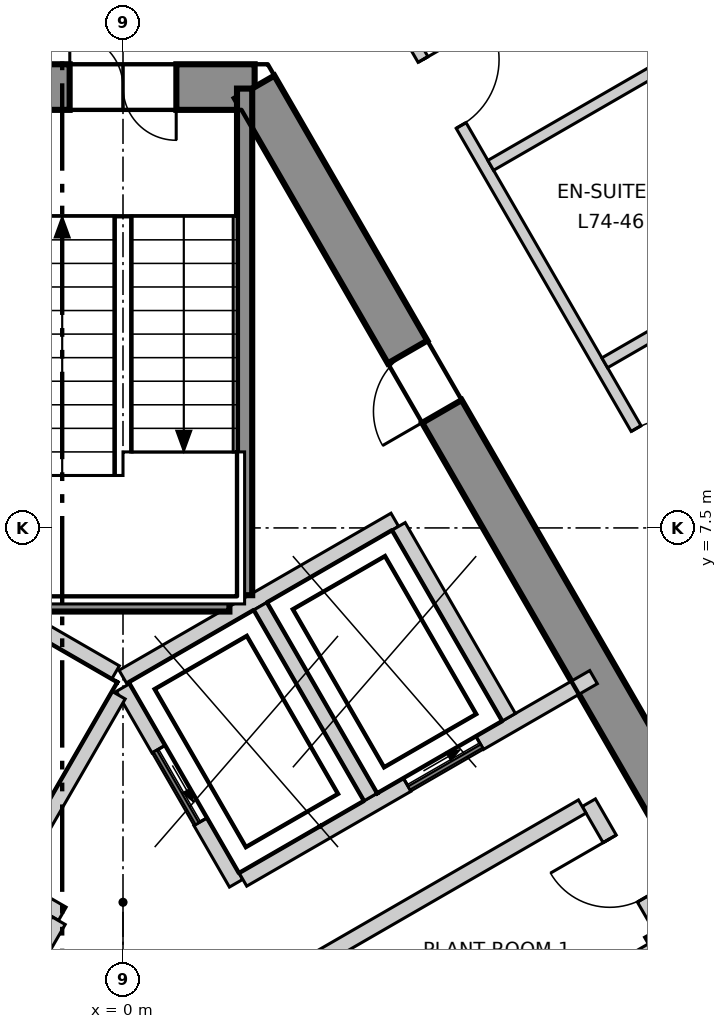
"""IFC4 building model, lengths in metres.
Left out: names, types, materials, properties, quantities, classifications, styles, units other than length and angle.
Written with IfcOpenShell. Run it as: python <this file> out.ifc"""

import sys

from ifc_helpers import new_model, si_unit, direction, frame, frame_2d, origin, place, context, subcontext, project, spatial, polyline, rectangle, outline, extrude, element, fill, save


model = new_model("IFC4")
c1 = context("Model", 3, precision=1e-05, world=origin(), true_north=direction((0.0, 1.0)))
c2 = subcontext(c1, "Body", "Model", "MODEL_VIEW")
j1 = project(units=[si_unit("LENGTHUNIT", "METRE"), si_unit("PLANEANGLEUNIT", "RADIAN")], contexts=[c1])
p1 = place(None, origin())
s1 = spatial("IfcSite", under=j1, at=p1, CompositionType="ELEMENT")
p2 = place(p1, origin())
s2 = spatial("IfcBuilding", under=s1, at=p2, CompositionType="ELEMENT")
p3 = place(p2, frame((0.0, 0.0, 311.5)))
s3 = spatial("IfcBuildingStorey", under=s2, at=p3, CompositionType="ELEMENT", Elevation=311.5)
p4 = place(p3, frame((1.732, 13.3, -0.3), z_axis=(0.0, 0.0, 1.0), x_axis=(-1.0, 0.0, 0.0)))
e1 = element("IfcWall", 1, at=p4, inside=s3, PredefinedType="SHEAR", context=c2, shape_type="SweptSolid", body=[
    extrude(outline(polyline([(-0.173, -0.3), (1.732, -0.3), (3.637, -0.3), (3.291, 0.3), (1.732, 0.3), (0.173, 0.3), (-0.173, -0.3)])), origin(), (0.0, 0.0, 1.0), 3.6),
])
p5 = place(p4, frame((1.032, 0.0, 0.3)))
e2 = element("IfcOpeningElement", 2, at=p5, cuts=e1, PredefinedType="OPENING", context=c2, shape_type="SweptSolid", body=[
    extrude(rectangle(XDim=1.4, YDim=2.1, at=frame_2d((0.7, 1.05))), frame((0.0, 0.31, 0.0), z_axis=(0.0, -1.0, 0.0), x_axis=(1.0, 0.0, 0.0)), (0.0, 0.0, 1.0), 0.62),
])
p6 = place(p3, frame((12.384, -5.15, -0.3), z_axis=(0.0, 0.0, 1.0), x_axis=(-0.500000539815, 0.866025092122, 0.0)))
e3 = element("IfcWall", 3, at=p6, inside=s3, PredefinedType="SHEAR", context=c2, shape_type="SweptSolid", body=[
    extrude(outline(polyline([(-0.173, -0.301), (1.795, -0.301), (3.763, -0.301), (5.731, -0.301), (7.7, -0.301), (9.668, -0.301), (11.636, -0.301), (13.604, -0.3), (15.573, -0.3), (17.541, -0.3), (19.509, -0.3), (21.477, -0.3), (21.131, 0.3), (19.226, 0.3), (17.321, 0.3), (15.415, 0.3), (13.51, 0.3), (11.605, 0.3), (9.699, 0.3), (7.794, 0.3), (5.889, 0.3), (3.984, 0.3), (2.078, 0.3), (0.173, 0.3), (-0.173, -0.301)])), origin(), (0.0, 0.0, 1.0), 3.6),
])
p7 = place(p6, frame((16.378, 0.0, 0.3)))
e4 = element("IfcOpeningElement", 4, at=p7, cuts=e3, PredefinedType="OPENING", context=c2, shape_type="SweptSolid", body=[
    extrude(rectangle(XDim=0.9, YDim=2.1, at=frame_2d((0.45, 1.05))), frame((0.0, 0.31, 0.0), z_axis=(0.0, -1.0, 0.0), x_axis=(1.0, 0.0, 0.0)), (0.0, 0.0, 1.0), 0.621),
])
p8 = place(p6, frame((4.026, 0.0, 0.3)))
e5 = element("IfcOpeningElement", 5, at=p8, cuts=e3, PredefinedType="OPENING", context=c2, shape_type="SweptSolid", body=[
    extrude(rectangle(XDim=0.9, YDim=2.1, at=frame_2d((0.45, 1.05))), frame((0.0, 0.31, 0.0), z_axis=(0.0, -1.0, 0.0), x_axis=(1.0, 0.0, 0.0)), (0.0, 0.0, 1.0), 0.621),
])
p9 = place(p3, frame((24.544, -11.385, 0.0), z_axis=(0.0, 0.0, 1.0), x_axis=(-0.500002044679, 0.866024223285, 0.0)))
e6 = element("IfcWall", 6, at=p9, inside=s3, PredefinedType="ELEMENTEDWALL", context=c2, shape_type="SweptSolid", body=[
    extrude(rectangle(XDim=44.243, YDim=0.2, at=frame_2d((22.122, 0.0))), origin(), (0.0, 0.0, 1.0), 3.3),
])
p10 = place(p9, frame((2.056, 0.0, 0.9)))
e7 = element("IfcOpeningElement", 7, at=p10, cuts=e6, PredefinedType="OPENING", context=c2, shape_type="SweptSolid", body=[
    extrude(rectangle(XDim=3.7, YDim=2.2, at=frame_2d((1.85, 1.1))), frame((0.0, 0.11, 0.0), z_axis=(0.0, -1.0, 0.0), x_axis=(1.0, 0.0, 0.0)), (0.0, 0.0, 1.0), 0.22),
])
p11 = place(p9, frame((7.264, 0.0, 0.9)))
e8 = element("IfcOpeningElement", 8, at=p11, cuts=e6, PredefinedType="OPENING", context=c2, shape_type="SweptSolid", body=[
    extrude(rectangle(XDim=3.7, YDim=2.2, at=frame_2d((1.85, 1.1))), frame((0.0, 0.11, 0.0), z_axis=(0.0, -1.0, 0.0), x_axis=(1.0, 0.0, 0.0)), (0.0, 0.0, 1.0), 0.22),
])
p12 = place(p9, frame((12.471, 0.0, 0.9)))
e9 = element("IfcOpeningElement", 9, at=p12, cuts=e6, PredefinedType="OPENING", context=c2, shape_type="SweptSolid", body=[
    extrude(rectangle(XDim=3.7, YDim=2.2, at=frame_2d((1.85, 1.1))), frame((0.0, 0.11, 0.0), z_axis=(0.0, -1.0, 0.0), x_axis=(1.0, 0.0, 0.0)), (0.0, 0.0, 1.0), 0.22),
])
p13 = place(p9, frame((17.678, 0.0, 0.9)))
e10 = element("IfcOpeningElement", 10, at=p13, cuts=e6, PredefinedType="OPENING", context=c2, shape_type="SweptSolid", body=[
    extrude(rectangle(XDim=3.7, YDim=2.2, at=frame_2d((1.85, 1.1))), frame((0.0, 0.11, 0.0), z_axis=(0.0, -1.0, 0.0), x_axis=(1.0, 0.0, 0.0)), (0.0, 0.0, 1.0), 0.22),
])
p14 = place(p9, frame((22.885, 0.0, 0.9)))
e11 = element("IfcOpeningElement", 11, at=p14, cuts=e6, PredefinedType="OPENING", context=c2, shape_type="SweptSolid", body=[
    extrude(rectangle(XDim=3.7, YDim=2.2, at=frame_2d((1.85, 1.1))), frame((0.0, 0.11, 0.0), z_axis=(0.0, -1.0, 0.0), x_axis=(1.0, 0.0, 0.0)), (0.0, 0.0, 1.0), 0.22),
])
p15 = place(p9, frame((28.093, 0.0, 0.9)))
e12 = element("IfcOpeningElement", 12, at=p15, cuts=e6, PredefinedType="OPENING", context=c2, shape_type="SweptSolid", body=[
    extrude(rectangle(XDim=3.7, YDim=2.2, at=frame_2d((1.85, 1.1))), frame((0.0, 0.11, 0.0), z_axis=(0.0, -1.0, 0.0), x_axis=(1.0, 0.0, 0.0)), (0.0, 0.0, 1.0), 0.22),
])
p16 = place(p9, frame((33.3, 0.0, 0.9)))
e13 = element("IfcOpeningElement", 13, at=p16, cuts=e6, PredefinedType="OPENING", context=c2, shape_type="SweptSolid", body=[
    extrude(rectangle(XDim=3.7, YDim=2.2, at=frame_2d((1.85, 1.1))), frame((0.0, 0.11, 0.0), z_axis=(0.0, -1.0, 0.0), x_axis=(1.0, 0.0, 0.0)), (0.0, 0.0, 1.0), 0.22),
])
p17 = place(p9, frame((38.507, 0.0, 0.9)))
e14 = element("IfcOpeningElement", 14, at=p17, cuts=e6, PredefinedType="OPENING", context=c2, shape_type="SweptSolid", body=[
    extrude(rectangle(XDim=3.7, YDim=2.2, at=frame_2d((1.85, 1.1))), frame((0.0, 0.11, 0.0), z_axis=(0.0, -1.0, 0.0), x_axis=(1.0, 0.0, 0.0)), (0.0, 0.0, 1.0), 0.22),
])
p18 = place(p3, frame((-17.678, -10.12, 0.0), z_axis=(0.0, 0.0, 1.0), x_axis=(0.49998824015, 0.86603219323, 0.0)))
e15 = element("IfcWall", 15, at=p18, inside=s3, PredefinedType="PARTITIONING", context=c2, shape_type="SweptSolid", body=[
    extrude(rectangle(XDim=35.357, YDim=0.15, at=frame_2d((17.678, 0.0))), origin(), (0.0, 0.0, 1.0), 3.3),
])
p19 = place(p18, frame((28.607, 0.0, 0.0)))
e16 = element("IfcOpeningElement", 16, at=p19, cuts=e15, PredefinedType="OPENING", context=c2, shape_type="SweptSolid", body=[
    extrude(rectangle(XDim=1.0, YDim=2.1, at=frame_2d((0.5, 1.05))), frame((0.0, 0.085, 0.0), z_axis=(0.0, -1.0, 0.0), x_axis=(1.0, 0.0, 0.0)), (0.0, 0.0, 1.0), 0.17),
])
p20 = place(p18, frame((13.86, 0.0, 0.0)))
e17 = element("IfcOpeningElement", 17, at=p20, cuts=e15, PredefinedType="OPENING", context=c2, shape_type="SweptSolid", body=[
    extrude(rectangle(XDim=1.0, YDim=2.1, at=frame_2d((0.5, 1.05))), frame((0.0, 0.085, 0.0), z_axis=(0.0, -1.0, 0.0), x_axis=(1.0, 0.0, 0.0)), (0.0, 0.0, 1.0), 0.17),
])
p21 = place(p18, frame((18.96, 0.0, 0.0)))
e18 = element("IfcOpeningElement", 18, at=p21, cuts=e15, PredefinedType="OPENING", context=c2, shape_type="SweptSolid", body=[
    extrude(rectangle(XDim=0.9, YDim=2.1, at=frame_2d((0.45, 1.05))), frame((0.0, 0.085, 0.0), z_axis=(0.0, -1.0, 0.0), x_axis=(1.0, 0.0, 0.0)), (0.0, 0.0, 1.0), 0.17),
])
p22 = place(p18, frame((16.86, 0.0, 0.0)))
e19 = element("IfcOpeningElement", 19, at=p22, cuts=e15, PredefinedType="OPENING", context=c2, shape_type="SweptSolid", body=[
    extrude(rectangle(XDim=0.9, YDim=2.1, at=frame_2d((0.45, 1.05))), frame((0.0, 0.085, 0.0), z_axis=(0.0, -1.0, 0.0), x_axis=(1.0, 0.0, 0.0)), (0.0, 0.0, 1.0), 0.17),
])
p23 = place(p18, frame((8.146, 0.0, 0.0)))
e20 = element("IfcOpeningElement", 20, at=p23, cuts=e15, PredefinedType="OPENING", context=c2, shape_type="SweptSolid", body=[
    extrude(rectangle(XDim=1.0, YDim=2.1, at=frame_2d((0.5, 1.05))), frame((0.0, 0.085, 0.0), z_axis=(0.0, -1.0, 0.0), x_axis=(1.0, 0.0, 0.0)), (0.0, 0.0, 1.0), 0.17),
])
p24 = place(p18, frame((3.038, 0.0, 0.0)))
e21 = element("IfcOpeningElement", 21, at=p24, cuts=e15, PredefinedType="OPENING", context=c2, shape_type="SweptSolid", body=[
    extrude(rectangle(XDim=1.0, YDim=2.1, at=frame_2d((0.5, 1.05))), frame((0.0, 0.085, 0.0), z_axis=(0.0, -1.0, 0.0), x_axis=(1.0, 0.0, 0.0)), (0.0, 0.0, 1.0), 0.17),
])
p25 = place(p3, frame((0.075, 20.37, 0.0), z_axis=(0.0, 0.0, 1.0), x_axis=(0.500006672087, -0.866021551619, 0.0)))
e22 = element("IfcWall", 22, at=p25, inside=s3, PredefinedType="PARTITIONING", context=c2, shape_type="SweptSolid", body=[
    extrude(rectangle(XDim=35.27, YDim=0.15, at=frame_2d((17.635, 0.0))), origin(), (0.0, 0.0, 1.0), 3.3),
])
p26 = place(p25, frame((31.206, 0.0, 0.0)))
e23 = element("IfcOpeningElement", 23, at=p26, cuts=e22, PredefinedType="OPENING", context=c2, shape_type="SweptSolid", body=[
    extrude(rectangle(XDim=1.0, YDim=2.1, at=frame_2d((0.5, 1.05))), frame((0.0, 0.085, 0.0), z_axis=(0.0, -1.0, 0.0), x_axis=(1.0, 0.0, 0.0)), (0.0, 0.0, 1.0), 0.17),
])
p27 = place(p25, frame((19.968, 0.0, 0.0)))
e24 = element("IfcOpeningElement", 24, at=p27, cuts=e22, PredefinedType="OPENING", context=c2, shape_type="SweptSolid", body=[
    extrude(rectangle(XDim=1.0, YDim=2.1, at=frame_2d((0.5, 1.05))), frame((0.0, 0.085, 0.0), z_axis=(0.0, -1.0, 0.0), x_axis=(1.0, 0.0, 0.0)), (0.0, 0.0, 1.0), 0.17),
])
p28 = place(p25, frame((13.353, 0.0, 0.0)))
e25 = element("IfcOpeningElement", 25, at=p28, cuts=e22, PredefinedType="OPENING", context=c2, shape_type="SweptSolid", body=[
    extrude(rectangle(XDim=1.0, YDim=2.1, at=frame_2d((0.5, 1.05))), frame((0.0, 0.085, 0.0), z_axis=(0.0, -1.0, 0.0), x_axis=(1.0, 0.0, 0.0)), (0.0, 0.0, 1.0), 0.17),
])
p29 = place(p25, frame((7.746, 0.0, 0.0)))
e26 = element("IfcOpeningElement", 26, at=p29, cuts=e22, PredefinedType="OPENING", context=c2, shape_type="SweptSolid", body=[
    extrude(rectangle(XDim=1.0, YDim=2.1, at=frame_2d((0.5, 1.05))), frame((0.0, 0.085, 0.0), z_axis=(0.0, -1.0, 0.0), x_axis=(1.0, 0.0, 0.0)), (0.0, 0.0, 1.0), 0.17),
])
p30 = place(p25, frame((3.038, 0.0, 0.0)))
e27 = element("IfcOpeningElement", 27, at=p30, cuts=e22, PredefinedType="OPENING", context=c2, shape_type="SweptSolid", body=[
    extrude(rectangle(XDim=1.0, YDim=2.1, at=frame_2d((0.5, 1.05))), frame((0.0, 0.085, 0.0), z_axis=(0.0, -1.0, 0.0), x_axis=(1.0, 0.0, 0.0)), (0.0, 0.0, 1.0), 0.17),
])
p31 = place(p3, frame((6.338, 9.672, 0.0), z_axis=(0.0, 0.0, 1.0), x_axis=(0.86604134632, 0.499972385701, 0.0)))
e28 = element("IfcWall", 28, at=p31, inside=s3, PredefinedType="PARTITIONING", context=c2, shape_type="SweptSolid", body=[
    extrude(rectangle(XDim=5.158, YDim=0.15, at=frame_2d((2.579, 0.0))), origin(), (0.0, 0.0, 1.0), 3.3),
])
p32 = place(p3, frame((4.838, 12.27, 0.0), z_axis=(0.0, 0.0, 1.0), x_axis=(0.866125586781, 0.4998264378, 0.0)))
e29 = element("IfcWall", 29, at=p32, inside=s3, PredefinedType="PARTITIONING", context=c2, shape_type="SweptSolid", body=[
    extrude(rectangle(XDim=2.507, YDim=0.15, at=frame_2d((1.253, 0.0))), origin(), (0.0, 0.0, 1.0), 3.3),
])
p33 = place(p3, frame((-0.002, 5.541, 0.0), z_axis=(0.0, 0.0, 1.0), x_axis=(0.86600155993, 0.500041296494, 0.0)))
e30 = element("IfcWall", 30, at=p33, inside=s3, PredefinedType="SOLIDWALL", context=c2, shape_type="SweptSolid", body=[
    extrude(rectangle(XDim=4.132, YDim=0.2, at=frame_2d((2.066, 0.0))), origin(), (0.0, 0.0, 1.0), 3.3),
])
p34 = place(p3, frame((0.0, 5.4, 0.0), z_axis=(0.0, 0.0, 1.0), x_axis=(0.500103862429, -0.865965430478, 0.0)))
e31 = element("IfcWall", 31, at=p34, inside=s3, PredefinedType="SOLIDWALL", context=c2, shape_type="SweptSolid", body=[
    extrude(rectangle(XDim=2.973, YDim=0.2, at=frame_2d((1.487, 0.0))), origin(), (0.0, 0.0, 1.0), 3.3),
])
p35 = place(p34, frame((0.937, 0.0, 0.0)))
e32 = element("IfcOpeningElement", 32, at=p35, cuts=e31, PredefinedType="OPENING", context=c2, shape_type="SweptSolid", body=[
    extrude(rectangle(XDim=1.1, YDim=2.1, at=frame_2d((0.55, 1.05))), frame((0.0, 0.11, 0.0), z_axis=(0.0, -1.0, 0.0), x_axis=(1.0, 0.0, 0.0)), (0.0, 0.0, 1.0), 0.22),
])
p36 = place(p3, frame((1.578, 2.874, 0.0), z_axis=(0.0, 0.0, 1.0), x_axis=(0.866045911672, 0.499964477614, 0.0)))
e33 = element("IfcWall", 33, at=p36, inside=s3, PredefinedType="SOLIDWALL", context=c2, shape_type="SweptSolid", body=[
    extrude(rectangle(XDim=5.327, YDim=0.2, at=frame_2d((2.663, 0.0))), origin(), (0.0, 0.0, 1.0), 3.3),
])
p37 = place(p36, frame((2.496, 0.0, 0.0)))
e34 = element("IfcOpeningElement", 34, at=p37, cuts=e33, PredefinedType="OPENING", context=c2, shape_type="SweptSolid", body=[
    extrude(rectangle(XDim=1.1, YDim=2.1, at=frame_2d((0.55, 1.05))), frame((0.0, 0.11, 0.0), z_axis=(0.0, -1.0, 0.0), x_axis=(1.0, 0.0, 0.0)), (0.0, 0.0, 1.0), 0.22),
])
for number, where, z_axis, x_axis in (
    (35, (3.626, 7.52, 0.0), (0.0, 0.0, 1.0), (0.5, -0.866, 0.0)),
    (36, (1.807, 6.47, 0.0), (0.0, 0.0, 1.0), (0.5, -0.866, 0.0)),
):
    element("IfcWall", number, at=place(p3, frame(where, z_axis=z_axis, x_axis=x_axis)), inside=s3, PredefinedType="SOLIDWALL", context=c2, shape_type="SweptSolid", body=[
        extrude(rectangle(XDim=2.9, YDim=0.2, at=frame_2d((1.45, 0.0))), origin(), (0.0, 0.0, 1.0), 3.3),
    ])
p38 = place(p3, frame((6.129, 3.885, 0.0), z_axis=(0.0, 0.0, 1.0), x_axis=(0.499952260202, -0.866052964615, 0.0)))
e37 = element("IfcWall", 37, at=p38, inside=s3, PredefinedType="SOLIDWALL", context=c2, shape_type="SweptSolid", body=[
    extrude(rectangle(XDim=1.901, YDim=0.2, at=frame_2d((0.95, 0.0))), origin(), (0.0, 0.0, 1.0), 3.3),
])
p39 = place(p38, frame((0.55, 0.0, 0.0)))
e38 = element("IfcOpeningElement", 38, at=p39, cuts=e37, PredefinedType="OPENING", context=c2, shape_type="SweptSolid", body=[
    extrude(rectangle(XDim=0.9, YDim=2.1, at=frame_2d((0.45, 1.05))), frame((0.0, 0.11, 0.0), z_axis=(0.0, -1.0, 0.0), x_axis=(1.0, 0.0, 0.0)), (0.0, 0.0, 1.0), 0.22),
])
p40 = place(p3, frame((2.275, 1.66, 0.0), z_axis=(0.0, 0.0, 1.0), x_axis=(0.866013608182, 0.500020430026, 0.0)))
e39 = element("IfcWall", 39, at=p40, inside=s3, PredefinedType="SOLIDWALL", context=c2, shape_type="SweptSolid", body=[
    extrude(rectangle(XDim=4.35, YDim=0.2, at=frame_2d((2.175, 0.0))), origin(), (0.0, 0.0, 1.0), 3.3),
])
p41 = place(p3, frame((-1.488, 2.822, 0.0), z_axis=(0.0, 0.0, 1.0), x_axis=(0.866236612152, -0.499633997809, 0.0)))
e40 = element("IfcWall", 40, at=p41, inside=s3, PredefinedType="SOLIDWALL", context=c2, shape_type="SweptSolid", body=[
    extrude(rectangle(XDim=0.796, YDim=0.2, at=frame_2d((0.398, 0.0))), origin(), (0.0, 0.0, 1.0), 3.3),
])
p42 = place(p3, frame((-2.444, -0.433, 0.0), z_axis=(0.0, 0.0, 1.0), x_axis=(0.500035624827, 0.866004834804, 0.0)))
e41 = element("IfcWall", 41, at=p42, inside=s3, PredefinedType="SOLIDWALL", context=c2, shape_type="SweptSolid", body=[
    extrude(rectangle(XDim=3.194, YDim=0.2, at=frame_2d((1.597, 0.0))), origin(), (0.0, 0.0, 1.0), 3.3),
])
p43 = place(p3, frame((-1.67, 6.507, 0.0), z_axis=(0.0, 0.0, 1.0), x_axis=(0.865941441609, -0.500145398563, 0.0)))
e42 = element("IfcWall", 42, at=p43, inside=s3, PredefinedType="SOLIDWALL", context=c2, shape_type="SweptSolid", body=[
    extrude(rectangle(XDim=1.815, YDim=0.2, at=frame_2d((0.908, 0.0))), origin(), (0.0, 0.0, 1.0), 3.3),
])
p44 = place(p3, frame((-1.438, 2.909, 0.0), z_axis=(0.0, 0.0, 1.0), x_axis=(0.499829630636, 0.866123744241, 0.0)))
e43 = element("IfcWall", 43, at=p44, inside=s3, PredefinedType="SOLIDWALL", context=c2, shape_type="SweptSolid", body=[
    extrude(rectangle(XDim=2.761, YDim=0.2, at=frame_2d((1.38, 0.0))), origin(), (0.0, 0.0, 1.0), 3.3),
])
p45 = place(p3, frame((6.826, 1.978, 0.0), z_axis=(0.0, 0.0, 1.0), x_axis=(0.499990139034, -0.866031096941, 0.0)))
e44 = element("IfcWall", 44, at=p45, inside=s3, PredefinedType="SOLIDWALL", context=c2, shape_type="SweptSolid", body=[
    extrude(rectangle(XDim=3.0, YDim=0.2, at=frame_2d((1.5, 0.0))), origin(), (0.0, 0.0, 1.0), 3.3),
])
p46 = place(p3, frame((6.912, 2.028, 0.0), z_axis=(0.0, 0.0, 1.0), x_axis=(0.866559367082, 0.499074005857, 0.0)))
e45 = element("IfcWall", 45, at=p46, inside=s3, PredefinedType="SOLIDWALL", context=c2, shape_type="SweptSolid", body=[
    extrude(rectangle(XDim=0.152, YDim=0.2, at=frame_2d((0.076, 0.0))), origin(), (0.0, 0.0, 1.0), 3.3),
])
p47 = place(p3, frame((1.6, 6.615, 0.0), z_axis=(0.0, 0.0, 1.0), x_axis=(0.0, 1.0, 0.0)))
e46 = element("IfcWall", 46, at=p47, inside=s3, PredefinedType="SOLIDWALL", context=c2, shape_type="SweptSolid", body=[
    extrude(rectangle(XDim=6.665, YDim=0.2, at=frame_2d((3.333, 0.0))), origin(), (0.0, 0.0, 1.0), 3.3),
])
p48 = place(p3, frame((-1.4, 6.5, 0.0), z_axis=(0.0, 0.0, 1.0), x_axis=(1.0, 0.0, 0.0)))
e47 = element("IfcWall", 47, at=p48, inside=s3, PredefinedType="SOLIDWALL", context=c2, shape_type="SweptSolid", body=[
    extrude(rectangle(XDim=2.8, YDim=0.2, at=frame_2d((1.4, 0.0))), origin(), (0.0, 0.0, 1.0), 3.3),
])
p49 = place(p35, origin())
e48 = element("IfcDoor", 48, at=p49, inside=s3, OperationType="SLIDING_TO_LEFT", PredefinedType="DOOR", context=c2, shape_type="SweptSolid", body=[
    extrude(rectangle(XDim=1.1, YDim=2.1, at=frame_2d((0.55, 1.05))), frame((0.0, 0.025, 0.0), z_axis=(0.0, -1.0, 0.0), x_axis=(1.0, 0.0, 0.0)), (0.0, 0.0, 1.0), 0.05),
])
fill(e32, e48)
p50 = place(p37, origin())
e49 = element("IfcDoor", 49, at=p50, inside=s3, OperationType="SLIDING_TO_LEFT", PredefinedType="DOOR", context=c2, shape_type="SweptSolid", body=[
    extrude(rectangle(XDim=1.1, YDim=2.1, at=frame_2d((0.55, 1.05))), frame((0.0, 0.025, 0.0), z_axis=(0.0, -1.0, 0.0), x_axis=(1.0, 0.0, 0.0)), (0.0, 0.0, 1.0), 0.05),
])
fill(e34, e49)
p51 = place(p28, origin())
e50 = element("IfcDoor", 50, at=p51, inside=s3, OperationType="SINGLE_SWING_LEFT", PredefinedType="DOOR", context=c2, shape_type="SweptSolid", body=[
    extrude(rectangle(XDim=1.0, YDim=2.1, at=frame_2d((0.5, 1.05))), frame((0.0, 0.025, 0.0), z_axis=(0.0, -1.0, 0.0), x_axis=(1.0, 0.0, 0.0)), (0.0, 0.0, 1.0), 0.05),
])
fill(e25, e50)
p52 = place(p29, origin())
e51 = element("IfcDoor", 51, at=p52, inside=s3, OperationType="SINGLE_SWING_RIGHT", PredefinedType="DOOR", context=c2, shape_type="SweptSolid", body=[
    extrude(rectangle(XDim=1.0, YDim=2.1, at=frame_2d((0.5, 1.05))), frame((0.0, 0.025, 0.0), z_axis=(0.0, -1.0, 0.0), x_axis=(1.0, 0.0, 0.0)), (0.0, 0.0, 1.0), 0.05),
])
fill(e26, e51)
p53 = place(p5, origin())
e52 = element("IfcDoor", 52, at=p53, inside=s3, OperationType="DOUBLE_DOOR_SINGLE_SWING", PredefinedType="DOOR", context=c2, shape_type="SweptSolid", body=[
    extrude(rectangle(XDim=1.4, YDim=2.1, at=frame_2d((0.7, 1.05))), frame((0.0, 0.025, 0.0), z_axis=(0.0, -1.0, 0.0), x_axis=(1.0, 0.0, 0.0)), (0.0, 0.0, 1.0), 0.05),
])
fill(e2, e52)
p54 = place(p7, origin())
e53 = element("IfcDoor", 53, at=p54, inside=s3, OperationType="SINGLE_SWING_RIGHT", PredefinedType="DOOR", context=c2, shape_type="SweptSolid", body=[
    extrude(rectangle(XDim=0.9, YDim=2.1, at=frame_2d((0.45, 1.05))), frame((0.0, 0.025, 0.0), z_axis=(0.0, -1.0, 0.0), x_axis=(1.0, 0.0, 0.0)), (0.0, 0.0, 1.0), 0.05),
])
fill(e4, e53)
p55 = place(p39, origin())
e54 = element("IfcDoor", 54, at=p55, inside=s3, OperationType="SINGLE_SWING_LEFT", PredefinedType="DOOR", context=c2, shape_type="SweptSolid", body=[
    extrude(rectangle(XDim=0.9, YDim=2.1, at=frame_2d((0.45, 1.05))), frame((0.0, 0.025, 0.0), z_axis=(0.0, -1.0, 0.0), x_axis=(1.0, 0.0, 0.0)), (0.0, 0.0, 1.0), 0.05),
])
fill(e38, e54)
save(model, sys.argv[1])
